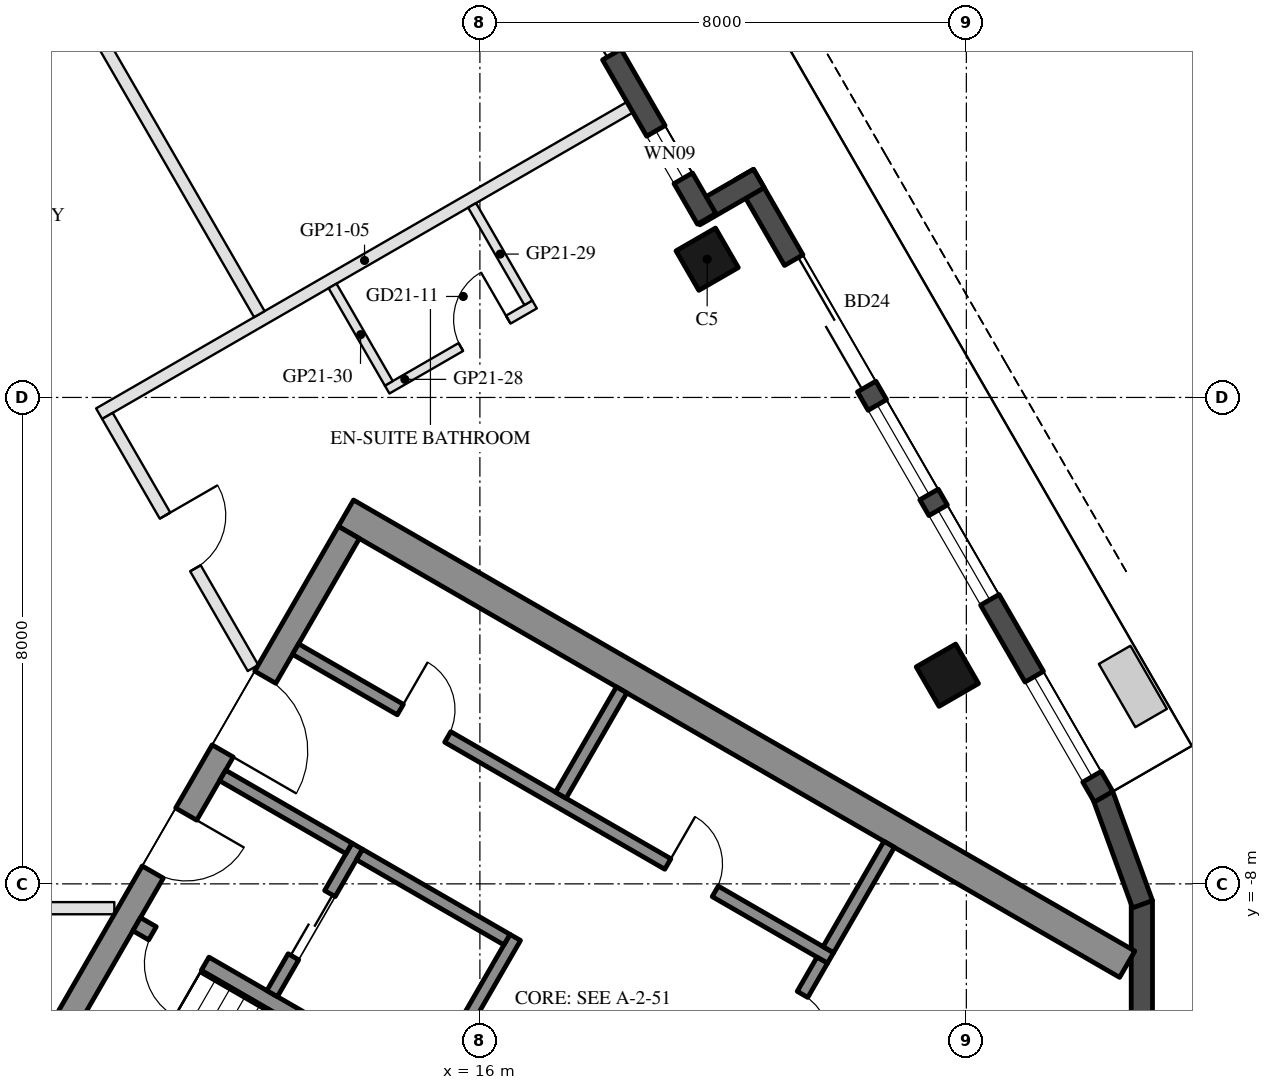
"""IFC4 building model, lengths in metres.
Left out: names, types, materials, properties, quantities, classifications, styles, units other than length and angle.
Written with IfcOpenShell. Run it as: python <this file> out.ifc"""

import sys

from ifc_helpers import new_model, si_unit, direction, frame, frame_2d, origin, origin_2d, place, context, subcontext, project, spatial, rectangle, hollow_rectangle, extrude, element, fill, save


model = new_model("IFC4")
c1 = context("Model", 3, precision=1e-05, world=origin(), true_north=direction((0.0, 1.0)))
c2 = subcontext(c1, "Body", "Model", "MODEL_VIEW")
j1 = project(units=[si_unit("LENGTHUNIT", "METRE"), si_unit("PLANEANGLEUNIT", "RADIAN")], contexts=[c1])
p1 = place(None, origin())
s1 = spatial("IfcSite", under=j1, at=p1, CompositionType="ELEMENT")
p2 = place(p1, origin())
s2 = spatial("IfcBuilding", under=s1, at=p2, CompositionType="ELEMENT")
p3 = place(p2, frame((0.0, 0.0, 220.6)))
s3 = spatial("IfcBuildingStorey", under=s2, at=p3, CompositionType="ELEMENT", Elevation=220.6)
for number, where, z_axis, x_axis in (
    (1, (23.688, -4.568, 0.0), (0.0, 0.0, 1.0), (-0.5, 0.866, 0.0)),
    (2, (19.738, 2.273, 0.0), (0.0, 0.0, 1.0), (-0.5, 0.866, 0.0)),
):
    element("IfcColumn", number, at=place(p3, frame(where, z_axis=z_axis, x_axis=x_axis)), inside=s3, PredefinedType="COLUMN", context=c2, shape_type="SweptSolid", body=[
        extrude(hollow_rectangle(XDim=0.75, YDim=0.75, WallThickness=0.035, at=origin_2d()), origin(), (0.0, 0.0, 1.0), 3.7),
    ])
for number, where, z_axis, x_axis in (
    (3, (26.244, -11.92, 0.0), (0.0, 0.0, 1.0), (0.342, 0.94, 0.0)),
    (4, (26.886, -10.185, 0.0), (0.0, 0.0, 1.0), (0.0, 1.0, 0.0)),
    (5, (26.897, -8.335, 0.0), (0.0, 0.0, 1.0), (-0.342, 0.94, 0.0)),
):
    element("IfcWall", number, at=place(p3, frame(where, z_axis=z_axis, x_axis=x_axis)), inside=s3, PredefinedType="SOLIDWALL", context=c2, shape_type="SweptSolid", body=[
        extrude(rectangle(XDim=1.91, YDim=0.35, at=frame_2d((0.955, 0.0))), origin(), (0.0, 0.0, 1.0), 3.55),
    ])
p4 = place(p3, frame((26.257, -6.567, 0.0), z_axis=(0.0, 0.0, 1.0), x_axis=(-0.500023526245, 0.866011820475, 0.0)))
e6 = element("IfcWall", 6, at=p4, inside=s3, PredefinedType="SOLIDWALL", context=c2, shape_type="SweptSolid", body=[
    extrude(rectangle(XDim=11.816, YDim=0.35, at=frame_2d((5.908, 0.0))), origin(), (0.0, 0.0, 1.0), 3.55),
])
p5 = place(p4, frame((0.38, 0.0, 0.3)))
e7 = element("IfcOpeningElement", 7, at=p5, cuts=e6, PredefinedType="OPENING", context=c2, shape_type="SweptSolid", body=[
    extrude(rectangle(XDim=1.9, YDim=2.65, at=frame_2d((0.95, 1.325))), frame((0.0, 0.185, 0.0), z_axis=(0.0, -1.0, 0.0), x_axis=(1.0, 0.0, 0.0)), (0.0, 0.0, 1.0), 0.37),
])
p6 = place(p4, frame((7.791, 0.0, 0.0)))
e8 = element("IfcOpeningElement", 8, at=p6, cuts=e6, PredefinedType="OPENING", context=c2, shape_type="SweptSolid", body=[
    extrude(rectangle(XDim=2.4, YDim=2.4, at=frame_2d((1.2, 1.2))), frame((0.0, 0.185, 0.0), z_axis=(0.0, -1.0, 0.0), x_axis=(1.0, 0.0, 0.0)), (0.0, 0.0, 1.0), 0.37),
])
p7 = place(p4, frame((3.741, 0.0, 0.3)))
e9 = element("IfcOpeningElement", 9, at=p7, cuts=e6, PredefinedType="OPENING", context=c2, shape_type="SweptSolid", body=[
    extrude(rectangle(XDim=1.7, YDim=2.65, at=frame_2d((0.85, 1.325))), frame((0.0, 0.185, 0.0), z_axis=(0.0, -1.0, 0.0), x_axis=(1.0, 0.0, 0.0)), (0.0, 0.0, 1.0), 0.37),
])
p8 = place(p4, frame((5.741, 0.0, 0.3)))
e10 = element("IfcOpeningElement", 10, at=p8, cuts=e6, PredefinedType="OPENING", context=c2, shape_type="SweptSolid", body=[
    extrude(rectangle(XDim=1.7, YDim=2.65, at=frame_2d((0.85, 1.325))), frame((0.0, 0.185, 0.0), z_axis=(0.0, -1.0, 0.0), x_axis=(1.0, 0.0, 0.0)), (0.0, 0.0, 1.0), 0.37),
])
p9 = place(p3, frame((20.588, 3.601, 0.0), z_axis=(0.0, 0.0, 1.0), x_axis=(-0.866005645448, -0.500034220881, 0.0)))
e11 = element("IfcWall", 11, at=p9, inside=s3, PredefinedType="SOLIDWALL", context=c2, shape_type="SweptSolid", body=[
    extrude(rectangle(XDim=1.22, YDim=0.35, at=frame_2d((0.61, 0.0))), origin(), (0.0, 0.0, 1.0), 3.55),
])
p10 = place(p3, frame((19.729, 2.938, 0.0), z_axis=(0.0, 0.0, 1.0), x_axis=(-0.499976430342, 0.866039011305, 0.0)))
e12 = element("IfcWall", 12, at=p10, inside=s3, PredefinedType="SOLIDWALL", context=c2, shape_type="SweptSolid", body=[
    extrude(rectangle(XDim=6.74, YDim=0.35, at=frame_2d((3.37, 0.0))), origin(), (0.0, 0.0, 1.0), 3.55),
])
p11 = place(p10, frame((0.77, 0.0, 0.3)))
e13 = element("IfcOpeningElement", 13, at=p11, cuts=e12, PredefinedType="OPENING", context=c2, shape_type="SweptSolid", body=[
    extrude(rectangle(XDim=0.9, YDim=2.65, at=frame_2d((0.45, 1.325))), frame((0.0, 0.185, 0.0), z_axis=(0.0, -1.0, 0.0), x_axis=(1.0, 0.0, 0.0)), (0.0, 0.0, 1.0), 0.37),
])
p12 = place(p10, frame((3.12, 0.0, 0.0)))
e14 = element("IfcOpeningElement", 14, at=p12, cuts=e12, PredefinedType="OPENING", context=c2, shape_type="SweptSolid", body=[
    extrude(rectangle(XDim=2.4, YDim=2.4, at=frame_2d((1.2, 1.2))), frame((0.0, 0.185, 0.0), z_axis=(0.0, -1.0, 0.0), x_axis=(1.0, 0.0, 0.0)), (0.0, 0.0, 1.0), 0.37),
])
p13 = place(p3, frame((13.797, -1.903, 0.0), z_axis=(0.0, 0.0, 1.0), x_axis=(0.866025009528, -0.500000682871, 0.0)))
e15 = element("IfcWall", 15, at=p13, inside=s3, PredefinedType="SHEAR", context=c2, shape_type="SweptSolid", body=[
    extrude(rectangle(XDim=14.837, YDim=0.5, at=frame_2d((7.418, 0.0))), origin(), (0.0, 0.0, 1.0), 3.5),
])
p14 = place(p3, frame((8.845, -10.88, 0.0), z_axis=(0.0, 0.0, 1.0), x_axis=(0.500004234368, 0.866022959057, 0.0)))
e16 = element("IfcWall", 16, at=p14, inside=s3, PredefinedType="SHEAR", context=c2, shape_type="SweptSolid", body=[
    extrude(rectangle(XDim=10.0, YDim=0.4, at=frame_2d((5.0, 0.0))), origin(), (0.0, 0.0, 1.0), 3.5),
])
p15 = place(p14, frame((3.55, 0.0, 0.0)))
e17 = element("IfcOpeningElement", 17, at=p15, cuts=e16, PredefinedType="OPENING", context=c2, shape_type="SweptSolid", body=[
    extrude(rectangle(XDim=1.1, YDim=2.1, at=frame_2d((0.55, 1.05))), frame((0.0, 0.21, 0.0), z_axis=(0.0, -1.0, 0.0), x_axis=(1.0, 0.0, 0.0)), (0.0, 0.0, 1.0), 0.42),
])
p16 = place(p14, frame((5.85, 0.0, 0.0)))
e18 = element("IfcOpeningElement", 18, at=p16, cuts=e16, PredefinedType="OPENING", context=c2, shape_type="SweptSolid", body=[
    extrude(rectangle(XDim=1.4, YDim=2.1, at=frame_2d((0.7, 1.05))), frame((0.0, 0.21, 0.0), z_axis=(0.0, -1.0, 0.0), x_axis=(1.0, 0.0, 0.0)), (0.0, 0.0, 1.0), 0.42),
])
p17 = place(p3, frame((10.356, -8.664, 0.0), z_axis=(0.0, 0.0, 1.0), x_axis=(0.866028629588, -0.499994412703, 0.0)))
e19 = element("IfcWall", 19, at=p17, inside=s3, PredefinedType="SHEAR", context=c2, shape_type="SweptSolid", body=[
    extrude(rectangle(XDim=6.45, YDim=0.25, at=frame_2d((3.225, 0.0))), origin(), (0.0, 0.0, 1.0), 3.5),
])
p18 = place(p17, frame((0.3, 0.0, 0.0)))
e20 = element("IfcOpeningElement", 20, at=p18, cuts=e19, PredefinedType="OPENING", context=c2, shape_type="SweptSolid", body=[
    extrude(rectangle(XDim=1.0, YDim=2.1, at=frame_2d((0.5, 1.05))), frame((0.0, 0.135, 0.0), z_axis=(0.0, -1.0, 0.0), x_axis=(1.0, 0.0, 0.0)), (0.0, 0.0, 1.0), 0.27),
])
p19 = place(p3, frame((15.181, -11.305, 0.0), z_axis=(0.0, 0.0, 1.0), x_axis=(0.49994636267, 0.866056369097, 0.0)))
e21 = element("IfcWall", 21, at=p19, inside=s3, PredefinedType="SHEAR", context=c2, shape_type="SweptSolid", body=[
    extrude(rectangle(XDim=2.8, YDim=0.2, at=frame_2d((1.4, 0.0))), origin(), (0.0, 0.0, 1.0), 3.5),
])
p20 = place(p3, frame((12.583, -9.805, 0.0), z_axis=(0.0, 0.0, 1.0), x_axis=(0.49994636267, 0.866056369097, 0.0)))
e22 = element("IfcWall", 22, at=p20, inside=s3, PredefinedType="SHEAR", context=c2, shape_type="SweptSolid", body=[
    extrude(rectangle(XDim=2.8, YDim=0.2, at=frame_2d((1.4, 0.0))), origin(), (0.0, 0.0, 1.0), 3.5),
])
p21 = place(p20, frame((0.7, 0.0, 0.0)))
e23 = element("IfcOpeningElement", 23, at=p21, cuts=e22, PredefinedType="OPENING", context=c2, shape_type="SweptSolid", body=[
    extrude(rectangle(XDim=1.2, YDim=2.1, at=frame_2d((0.6, 1.05))), frame((0.0, 0.11, 0.0), z_axis=(0.0, -1.0, 0.0), x_axis=(1.0, 0.0, 0.0)), (0.0, 0.0, 1.0), 0.22),
])
p22 = place(p3, frame((11.768, -6.217, 0.0), z_axis=(0.0, 0.0, 1.0), x_axis=(0.866050077142, -0.499957262057, 0.0)))
e24 = element("IfcWall", 24, at=p22, inside=s3, PredefinedType="SHEAR", context=c2, shape_type="SweptSolid", body=[
    extrude(rectangle(XDim=2.4, YDim=0.2, at=frame_2d((1.2, 0.0))), origin(), (0.0, 0.0, 1.0), 3.5),
])
p23 = place(p3, frame((14.02, -7.517, 0.0), z_axis=(0.0, 0.0, 1.0), x_axis=(0.866034573852, -0.49998411664, 0.0)))
e25 = element("IfcWall", 25, at=p23, inside=s3, PredefinedType="SHEAR", context=c2, shape_type="SweptSolid", body=[
    extrude(rectangle(XDim=2.8, YDim=0.2, at=frame_2d((1.4, 0.0))), origin(), (0.0, 0.0, 1.0), 3.5),
])
p24 = place(p3, frame((12.968, -4.138, 0.0), z_axis=(0.0, 0.0, 1.0), x_axis=(0.866028328073, -0.49999493495, 0.0)))
e26 = element("IfcWall", 26, at=p24, inside=s3, PredefinedType="SHEAR", context=c2, shape_type="SweptSolid", body=[
    extrude(rectangle(XDim=10.16, YDim=0.2, at=frame_2d((5.08, 0.0))), origin(), (0.0, 0.0, 1.0), 3.5),
])
p25 = place(p24, frame((1.99, 0.0, 0.0)))
e27 = element("IfcOpeningElement", 27, at=p25, cuts=e26, PredefinedType="OPENING", context=c2, shape_type="SweptSolid", body=[
    extrude(rectangle(XDim=0.9, YDim=2.1, at=frame_2d((0.45, 1.05))), frame((0.0, 0.11, 0.0), z_axis=(0.0, -1.0, 0.0), x_axis=(1.0, 0.0, 0.0)), (0.0, 0.0, 1.0), 0.22),
])
p26 = place(p24, frame((7.07, 0.0, 0.0)))
e28 = element("IfcOpeningElement", 28, at=p26, cuts=e26, PredefinedType="OPENING", context=c2, shape_type="SweptSolid", body=[
    extrude(rectangle(XDim=0.9, YDim=2.1, at=frame_2d((0.45, 1.05))), frame((0.0, 0.11, 0.0), z_axis=(0.0, -1.0, 0.0), x_axis=(1.0, 0.0, 0.0)), (0.0, 0.0, 1.0), 0.22),
])
p27 = place(p3, frame((20.43, -11.333, 0.0), z_axis=(0.0, 0.0, 1.0), x_axis=(0.500001309137, 0.866024647952, 0.0)))
e29 = element("IfcWall", 29, at=p27, inside=s3, PredefinedType="SHEAR", context=c2, shape_type="SweptSolid", body=[
    extrude(rectangle(XDim=2.4, YDim=0.2, at=frame_2d((1.2, 0.0))), origin(), (0.0, 0.0, 1.0), 3.5),
])
p28 = place(p27, frame((0.85, 0.0, 0.0)))
e30 = element("IfcOpeningElement", 30, at=p28, cuts=e29, PredefinedType="OPENING", context=c2, shape_type="SweptSolid", body=[
    extrude(rectangle(XDim=0.9, YDim=2.1, at=frame_2d((0.45, 1.05))), frame((0.0, 0.11, 0.0), z_axis=(0.0, -1.0, 0.0), x_axis=(1.0, 0.0, 0.0)), (0.0, 0.0, 1.0), 0.22),
])
for number, where, z_axis, x_axis in (
    (31, (17.331, -6.542, 0.0), (0.0, 0.0, 1.0), (0.5, 0.866, 0.0)),
    (32, (21.73, -9.082, 0.0), (0.0, 0.0, 1.0), (0.5, 0.866, 0.0)),
):
    element("IfcWall", number, at=place(p3, frame(where, z_axis=z_axis, x_axis=x_axis)), inside=s3, PredefinedType="SHEAR", context=c2, shape_type="SweptSolid", body=[
        extrude(rectangle(XDim=2.0, YDim=0.2, at=frame_2d((1.0, 0.0))), origin(), (0.0, 0.0, 1.0), 3.5),
    ])
p29 = place(p3, frame((18.468, 4.773, 0.0), z_axis=(0.0, 0.0, 1.0), x_axis=(-0.866033125095, -0.499986626058, 0.0)))
e33 = element("IfcWall", 33, at=p29, inside=s3, PredefinedType="PARTITIONING", context=c2, shape_type="SweptSolid", body=[
    extrude(rectangle(XDim=10.08, YDim=0.2, at=frame_2d((5.04, 0.0))), origin(), (0.0, 0.0, 1.0), 3.06),
])
p30 = place(p3, frame((9.988, -8.4, 0.0), z_axis=(0.0, 0.0, 1.0), x_axis=(-1.0, 0.0, 0.0)))
e34 = element("IfcWall", 34, at=p30, inside=s3, PredefinedType="PARTITIONING", context=c2, shape_type="SweptSolid", body=[
    extrude(rectangle(XDim=3.782, YDim=0.2, at=frame_2d((1.891, 0.0))), origin(), (0.0, 0.0, 1.0), 2.95),
])
p31 = place(p30, frame((1.391, 0.0, 0.0)))
e35 = element("IfcOpeningElement", 35, at=p31, cuts=e34, PredefinedType="OPENING", context=c2, shape_type="SweptSolid", body=[
    extrude(rectangle(XDim=1.0, YDim=2.1, at=frame_2d((0.5, 1.05))), frame((0.0, 0.11, 0.0), z_axis=(0.0, -1.0, 0.0), x_axis=(1.0, 0.0, 0.0)), (0.0, 0.0, 1.0), 0.22),
])
p32 = place(p3, frame((9.875, -0.303, 0.0), z_axis=(0.0, 0.0, 1.0), x_axis=(0.500026984917, -0.866009823475, 0.0)))
e36 = element("IfcWall", 36, at=p32, inside=s3, PredefinedType="PARTITIONING", context=c2, shape_type="SweptSolid", body=[
    extrude(rectangle(XDim=4.788, YDim=0.2, at=frame_2d((2.394, 0.0))), origin(), (0.0, 0.0, 1.0), 2.95),
])
p33 = place(p32, frame((1.894, 0.0, 0.0)))
e37 = element("IfcOpeningElement", 37, at=p33, cuts=e36, PredefinedType="OPENING", context=c2, shape_type="SweptSolid", body=[
    extrude(rectangle(XDim=1.0, YDim=2.1, at=frame_2d((0.5, 1.05))), frame((0.0, 0.11, 0.0), z_axis=(0.0, -1.0, 0.0), x_axis=(1.0, 0.0, 0.0)), (0.0, 0.0, 1.0), 0.22),
])
p34 = place(p3, frame((14.474, 0.13, 0.0), z_axis=(0.0, 0.0, 1.0), x_axis=(0.866056369097, 0.49994636267, 0.0)))
e38 = element("IfcWall", 38, at=p34, inside=s3, PredefinedType="PARTITIONING", context=c2, shape_type="SweptSolid", body=[
    extrude(rectangle(XDim=2.8, YDim=0.15, at=frame_2d((1.4, 0.0))), origin(), (0.0, 0.0, 1.0), 3.55),
])
p35 = place(p34, frame((1.4, 0.0, 0.0)))
e39 = element("IfcOpeningElement", 39, at=p35, cuts=e38, PredefinedType="OPENING", context=c2, shape_type="SweptSolid", body=[
    extrude(rectangle(XDim=0.9, YDim=2.1, at=frame_2d((0.45, 1.05))), frame((0.0, 0.085, 0.0), z_axis=(0.0, -1.0, 0.0), x_axis=(1.0, 0.0, 0.0)), (0.0, 0.0, 1.0), 0.17),
])
for number, where, z_axis, x_axis in (
    (40, (16.797, 1.557, 0.0), (0.0, 0.0, 1.0), (-0.5, 0.866, 0.0)),
    (41, (14.502, 0.232, 0.0), (0.0, 0.0, 1.0), (-0.5, 0.866, 0.0)),
):
    element("IfcWall", number, at=place(p3, frame(where, z_axis=z_axis, x_axis=x_axis)), inside=s3, PredefinedType="PARTITIONING", context=c2, shape_type="SweptSolid", body=[
        extrude(rectangle(XDim=1.85, YDim=0.15, at=frame_2d((0.925, 0.0))), origin(), (0.0, 0.0, 1.0), 3.55),
    ])
p36 = place(p3, frame((6.873, 10.896, 0.0), z_axis=(0.0, 0.0, 1.0), x_axis=(0.499996545922, -0.866027397988, 0.0)))
e42 = element("IfcWall", 42, at=p36, inside=s3, PredefinedType="PARTITIONING", context=c2, shape_type="SweptSolid", body=[
    extrude(rectangle(XDim=11.0, YDim=0.2, at=frame_2d((5.5, 0.0))), origin(), (0.0, 0.0, 1.0), 2.95),
])
p37 = place(p36, frame((2.45, 0.0, 0.0)))
e43 = element("IfcOpeningElement", 43, at=p37, cuts=e42, PredefinedType="OPENING", context=c2, shape_type="SweptSolid", body=[
    extrude(rectangle(XDim=1.0, YDim=2.1, at=frame_2d((0.5, 1.05))), frame((0.0, 0.11, 0.0), z_axis=(0.0, -1.0, 0.0), x_axis=(1.0, 0.0, 0.0)), (0.0, 0.0, 1.0), 0.22),
])
p38 = place(p5, origin())
e44 = element("IfcWindow", 44, at=p38, inside=s3, PartitioningType="SINGLE_PANEL", PredefinedType="WINDOW", context=c2, shape_type="SweptSolid", body=[
    extrude(rectangle(XDim=1.9, YDim=2.65, at=frame_2d((0.95, 1.325))), frame((0.0, 0.03, 0.0), z_axis=(0.0, -1.0, 0.0), x_axis=(1.0, 0.0, 0.0)), (0.0, 0.0, 1.0), 0.06),
])
fill(e7, e44)
p39 = place(p6, frame((2.4, 0.0, 0.0), z_axis=(0.0, 0.0, 1.0), x_axis=(-1.0, 0.0, 0.0)))
e45 = element("IfcDoor", 45, at=p39, inside=s3, OperationType="SLIDING_TO_LEFT", PredefinedType="DOOR", context=c2, shape_type="SweptSolid", body=[
    extrude(rectangle(XDim=2.4, YDim=2.4, at=frame_2d((1.2, 1.2))), frame((0.0, 0.025, 0.0), z_axis=(0.0, -1.0, 0.0), x_axis=(1.0, 0.0, 0.0)), (0.0, 0.0, 1.0), 0.05),
])
fill(e8, e45)
p40 = place(p7, origin())
e46 = element("IfcWindow", 46, at=p40, inside=s3, PartitioningType="SINGLE_PANEL", PredefinedType="WINDOW", context=c2, shape_type="SweptSolid", body=[
    extrude(rectangle(XDim=1.7, YDim=2.65, at=frame_2d((0.85, 1.325))), frame((0.0, 0.03, 0.0), z_axis=(0.0, -1.0, 0.0), x_axis=(1.0, 0.0, 0.0)), (0.0, 0.0, 1.0), 0.06),
])
fill(e9, e46)
p41 = place(p8, origin())
e47 = element("IfcWindow", 47, at=p41, inside=s3, PartitioningType="SINGLE_PANEL", PredefinedType="WINDOW", context=c2, shape_type="SweptSolid", body=[
    extrude(rectangle(XDim=1.7, YDim=2.65, at=frame_2d((0.85, 1.325))), frame((0.0, 0.03, 0.0), z_axis=(0.0, -1.0, 0.0), x_axis=(1.0, 0.0, 0.0)), (0.0, 0.0, 1.0), 0.06),
])
fill(e10, e47)
p42 = place(p11, origin())
e48 = element("IfcWindow", 48, at=p42, inside=s3, PartitioningType="SINGLE_PANEL", PredefinedType="WINDOW", context=c2, shape_type="SweptSolid", body=[
    extrude(rectangle(XDim=0.9, YDim=2.65, at=frame_2d((0.45, 1.325))), frame((0.0, 0.03, 0.0), z_axis=(0.0, -1.0, 0.0), x_axis=(1.0, 0.0, 0.0)), (0.0, 0.0, 1.0), 0.06),
])
fill(e13, e48)
p43 = place(p12, frame((2.4, 0.0, 0.0), z_axis=(0.0, 0.0, 1.0), x_axis=(-1.0, 0.0, 0.0)))
e49 = element("IfcDoor", 49, at=p43, inside=s3, OperationType="SLIDING_TO_LEFT", PredefinedType="DOOR", context=c2, shape_type="SweptSolid", body=[
    extrude(rectangle(XDim=2.4, YDim=2.4, at=frame_2d((1.2, 1.2))), frame((0.0, 0.025, 0.0), z_axis=(0.0, -1.0, 0.0), x_axis=(1.0, 0.0, 0.0)), (0.0, 0.0, 1.0), 0.05),
])
fill(e14, e49)
p44 = place(p21, origin())
e50 = element("IfcDoor", 50, at=p44, inside=s3, OperationType="DOUBLE_DOOR_SLIDING", PredefinedType="DOOR", context=c2, shape_type="SweptSolid", body=[
    extrude(rectangle(XDim=1.2, YDim=2.1, at=frame_2d((0.6, 1.05))), frame((0.0, 0.025, 0.0), z_axis=(0.0, -1.0, 0.0), x_axis=(1.0, 0.0, 0.0)), (0.0, 0.0, 1.0), 0.05),
])
fill(e23, e50)
p45 = place(p25, origin())
e51 = element("IfcDoor", 51, at=p45, inside=s3, OperationType="SINGLE_SWING_LEFT", PredefinedType="DOOR", context=c2, shape_type="SweptSolid", body=[
    extrude(rectangle(XDim=0.9, YDim=2.1, at=frame_2d((0.45, 1.05))), frame((0.0, 0.025, 0.0), z_axis=(0.0, -1.0, 0.0), x_axis=(1.0, 0.0, 0.0)), (0.0, 0.0, 1.0), 0.05),
])
fill(e27, e51)
p46 = place(p26, origin())
e52 = element("IfcDoor", 52, at=p46, inside=s3, OperationType="SINGLE_SWING_LEFT", PredefinedType="DOOR", context=c2, shape_type="SweptSolid", body=[
    extrude(rectangle(XDim=0.9, YDim=2.1, at=frame_2d((0.45, 1.05))), frame((0.0, 0.025, 0.0), z_axis=(0.0, -1.0, 0.0), x_axis=(1.0, 0.0, 0.0)), (0.0, 0.0, 1.0), 0.05),
])
fill(e28, e52)
p47 = place(p28, frame((0.9, 0.0, 0.0), z_axis=(0.0, 0.0, 1.0), x_axis=(-1.0, 0.0, 0.0)))
e53 = element("IfcDoor", 53, at=p47, inside=s3, OperationType="SINGLE_SWING_RIGHT", PredefinedType="DOOR", context=c2, shape_type="SweptSolid", body=[
    extrude(rectangle(XDim=0.9, YDim=2.1, at=frame_2d((0.45, 1.05))), frame((0.0, 0.025, 0.0), z_axis=(0.0, -1.0, 0.0), x_axis=(1.0, 0.0, 0.0)), (0.0, 0.0, 1.0), 0.05),
])
fill(e30, e53)
p48 = place(p15, frame((1.1, 0.0, 0.0), z_axis=(0.0, 0.0, 1.0), x_axis=(-1.0, 0.0, 0.0)))
e54 = element("IfcDoor", 54, at=p48, inside=s3, OperationType="SINGLE_SWING_LEFT", PredefinedType="DOOR", context=c2, shape_type="SweptSolid", body=[
    extrude(rectangle(XDim=1.1, YDim=2.1, at=frame_2d((0.55, 1.05))), frame((0.0, 0.025, 0.0), z_axis=(0.0, -1.0, 0.0), x_axis=(1.0, 0.0, 0.0)), (0.0, 0.0, 1.0), 0.05),
])
fill(e17, e54)
p49 = place(p16, frame((1.4, 0.0, 0.0), z_axis=(0.0, 0.0, 1.0), x_axis=(-1.0, 0.0, 0.0)))
e55 = element("IfcDoor", 55, at=p49, inside=s3, OperationType="DOUBLE_DOOR_SINGLE_SWING", PredefinedType="DOOR", context=c2, shape_type="SweptSolid", body=[
    extrude(rectangle(XDim=1.4, YDim=2.1, at=frame_2d((0.7, 1.05))), frame((0.0, 0.025, 0.0), z_axis=(0.0, -1.0, 0.0), x_axis=(1.0, 0.0, 0.0)), (0.0, 0.0, 1.0), 0.05),
])
fill(e18, e55)
p50 = place(p18, frame((1.0, 0.0, 0.0), z_axis=(0.0, 0.0, 1.0), x_axis=(-1.0, 0.0, 0.0)))
e56 = element("IfcDoor", 56, at=p50, inside=s3, OperationType="SINGLE_SWING_LEFT", PredefinedType="DOOR", context=c2, shape_type="SweptSolid", body=[
    extrude(rectangle(XDim=1.0, YDim=2.1, at=frame_2d((0.5, 1.05))), frame((0.0, 0.025, 0.0), z_axis=(0.0, -1.0, 0.0), x_axis=(1.0, 0.0, 0.0)), (0.0, 0.0, 1.0), 0.05),
])
fill(e20, e56)
p51 = place(p35, origin())
e57 = element("IfcDoor", 57, at=p51, inside=s3, OperationType="SINGLE_SWING_RIGHT", PredefinedType="DOOR", context=c2, shape_type="SweptSolid", body=[
    extrude(rectangle(XDim=0.9, YDim=2.1, at=frame_2d((0.45, 1.05))), frame((0.0, 0.025, 0.0), z_axis=(0.0, -1.0, 0.0), x_axis=(1.0, 0.0, 0.0)), (0.0, 0.0, 1.0), 0.05),
])
fill(e39, e57)
p52 = place(p33, origin())
e58 = element("IfcDoor", 58, at=p52, inside=s3, OperationType="SINGLE_SWING_LEFT", PredefinedType="DOOR", context=c2, shape_type="SweptSolid", body=[
    extrude(rectangle(XDim=1.0, YDim=2.1, at=frame_2d((0.5, 1.05))), frame((0.0, 0.025, 0.0), z_axis=(0.0, -1.0, 0.0), x_axis=(1.0, 0.0, 0.0)), (0.0, 0.0, 1.0), 0.05),
])
fill(e37, e58)
save(model, sys.argv[1])
